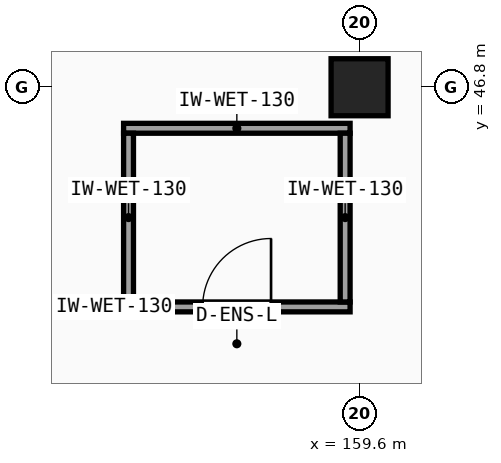
"""IFC4 building model, lengths in metres.
Left out: names, types, materials, properties, quantities, classifications, styles, units other than length and angle.
Written with IfcOpenShell. Run it as: python <this file> out.ifc"""

import sys

from ifc_helpers import new_model, si_unit, direction, frame, frame_2d, origin, origin_2d, place, context, subcontext, project, spatial, rectangle, extrude, element, fill, save


model = new_model("IFC4")
c1 = context("Model", 3, precision=1e-05, world=origin(), true_north=direction((0.0, 1.0)))
c2 = subcontext(c1, "Body", "Model", "MODEL_VIEW")
j1 = project(units=[si_unit("LENGTHUNIT", "METRE"), si_unit("PLANEANGLEUNIT", "RADIAN")], contexts=[c1])
p1 = place(None, origin())
s1 = spatial("IfcSite", under=j1, at=p1, CompositionType="ELEMENT")
p2 = place(p1, origin())
s2 = spatial("IfcBuilding", under=s1, at=p2, CompositionType="ELEMENT")
p3 = place(p2, frame((0.0, 0.0, 5.1)))
s3 = spatial("IfcBuildingStorey", under=s2, at=p3, CompositionType="ELEMENT", Elevation=5.1)
p4 = place(p3, frame((159.6, 46.8, 0.0), z_axis=(0.0, 0.0, 1.0), x_axis=(1.0, 0.0, 0.0)))
e1 = element("IfcColumn", 1, at=p4, inside=s3, PredefinedType="COLUMN", context=c2, shape_type="SweptSolid", body=[
    extrude(rectangle(XDim=0.75, YDim=0.75, at=origin_2d()), origin(), (0.0, 0.0, 1.0), 5.1),
])
p5 = place(p3, frame((156.495, 43.91, 0.0), z_axis=(0.0, 0.0, 1.0), x_axis=(1.0, 0.0, 0.0)))
e2 = element("IfcWall", 2, at=p5, inside=s3, PredefinedType="PARTITIONING", context=c2, shape_type="SweptSolid", body=[
    extrude(rectangle(XDim=2.98, YDim=0.13, at=frame_2d((1.49, 0.0))), origin(), (0.0, 0.0, 1.0), 4.38),
])
p6 = place(p5, frame((1.04, 0.0, 0.0)))
e3 = element("IfcOpeningElement", 3, at=p6, cuts=e2, PredefinedType="OPENING", context=c2, shape_type="SweptSolid", body=[
    extrude(rectangle(XDim=0.9, YDim=2.1, at=frame_2d((0.45, 1.05))), frame((0.0, 0.075, 0.0), z_axis=(0.0, -1.0, 0.0), x_axis=(1.0, 0.0, 0.0)), (0.0, 0.0, 1.0), 0.15),
])
p7 = place(p3, frame((156.495, 46.26, 0.0), z_axis=(0.0, 0.0, 1.0), x_axis=(1.0, 0.0, 0.0)))
e4 = element("IfcWall", 4, at=p7, inside=s3, PredefinedType="PARTITIONING", context=c2, shape_type="SweptSolid", body=[
    extrude(rectangle(XDim=2.98, YDim=0.13, at=frame_2d((1.49, 0.0))), origin(), (0.0, 0.0, 1.0), 4.38),
])
p8 = place(p3, frame((156.56, 43.975, 0.0), z_axis=(0.0, 0.0, 1.0), x_axis=(0.0, 1.0, 0.0)))
e5 = element("IfcWall", 5, at=p8, inside=s3, PredefinedType="PARTITIONING", context=c2, shape_type="SweptSolid", body=[
    extrude(rectangle(XDim=2.22, YDim=0.13, at=frame_2d((1.11, 0.0))), origin(), (0.0, 0.0, 1.0), 4.82),
])
p9 = place(p3, frame((159.41, 43.975, 0.0), z_axis=(0.0, 0.0, 1.0), x_axis=(0.0, 1.0, 0.0)))
e6 = element("IfcWall", 6, at=p9, inside=s3, PredefinedType="PARTITIONING", context=c2, shape_type="SweptSolid", body=[
    extrude(rectangle(XDim=2.22, YDim=0.13, at=frame_2d((1.11, 0.0))), origin(), (0.0, 0.0, 1.0), 4.38),
])
p10 = place(p6, origin())
e7 = element("IfcDoor", 7, at=p10, inside=s3, OperationType="SINGLE_SWING_RIGHT", PredefinedType="DOOR", context=c2, shape_type="SweptSolid", body=[
    extrude(rectangle(XDim=0.9, YDim=2.1, at=frame_2d((0.45, 1.05))), frame((0.0, 0.025, 0.0), z_axis=(0.0, -1.0, 0.0), x_axis=(1.0, 0.0, 0.0)), (0.0, 0.0, 1.0), 0.05),
])
fill(e3, e7)
save(model, sys.argv[1])
